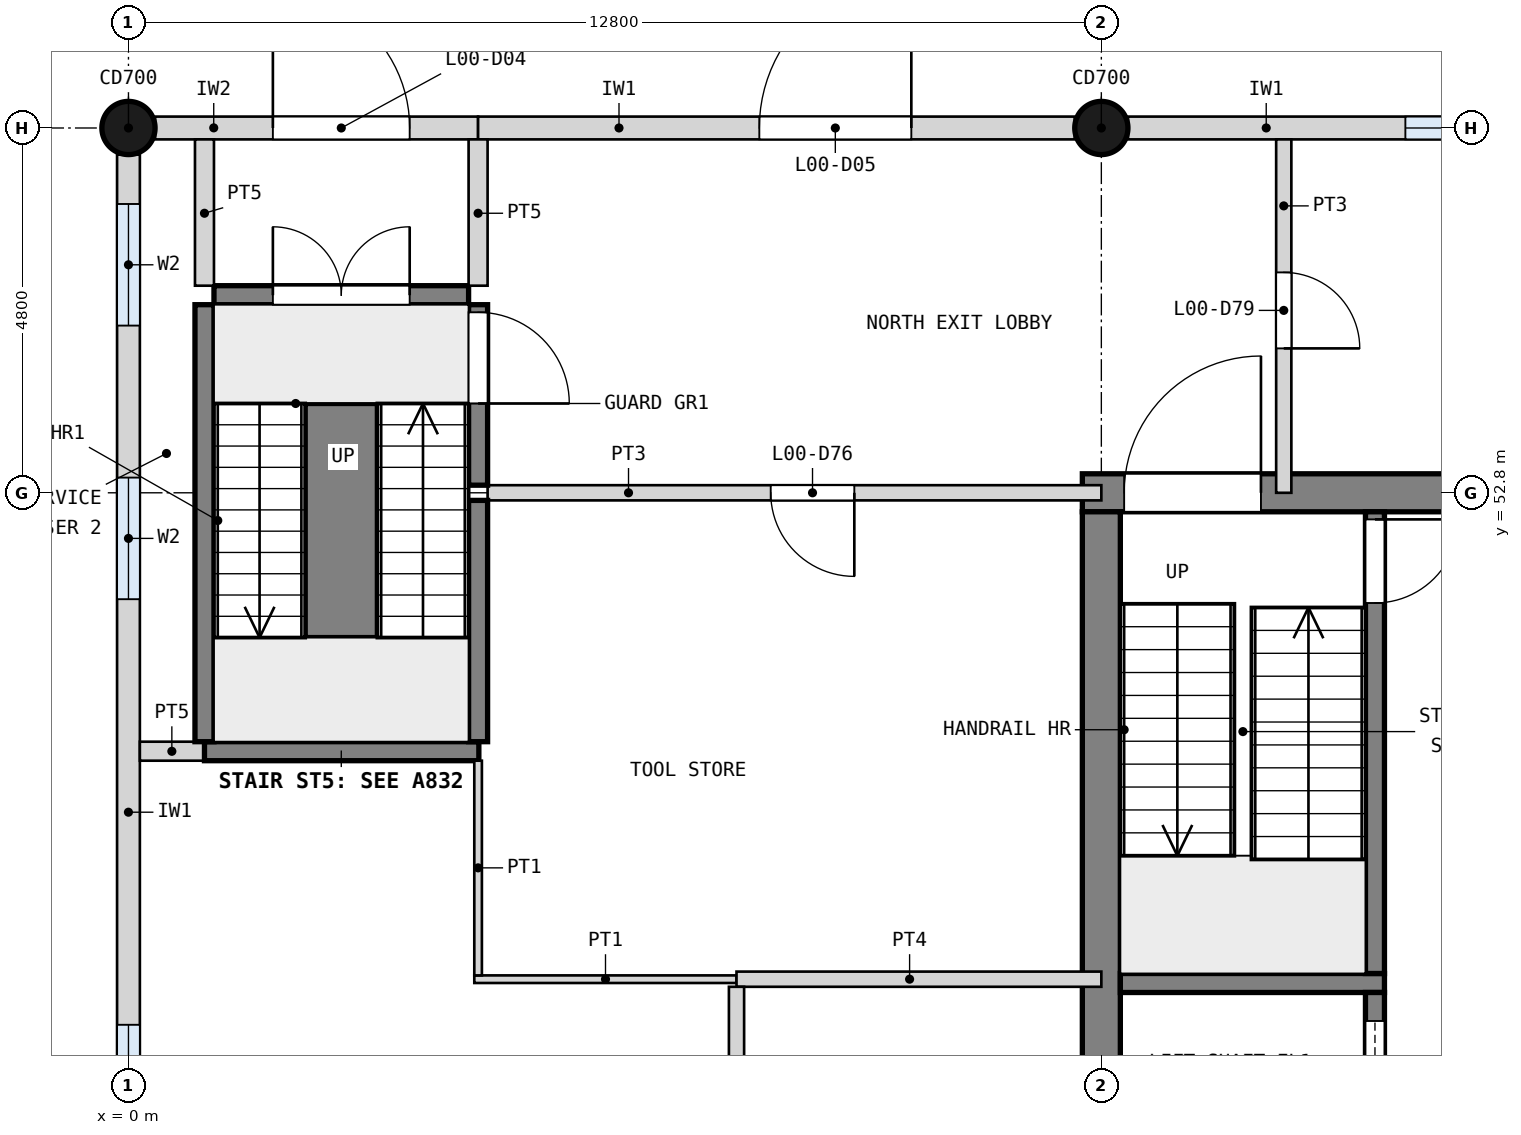
"""IFC4 building model, lengths in metres.
Left out: names, types, materials, properties, quantities, classifications, styles, units other than length and angle.
Written with IfcOpenShell. Run it as: python <this file> out.ifc"""

import sys

from ifc_helpers import new_model, si_unit, direction, frame, frame_2d, origin, origin_2d, place, context, subcontext, project, spatial, rectangle, circle, extrude, element, fill, save


model = new_model("IFC4")
c1 = context("Model", 3, precision=1e-05, world=origin(), true_north=direction((0.0, 1.0)))
c2 = subcontext(c1, "Body", "Model", "MODEL_VIEW")
j1 = project(units=[si_unit("LENGTHUNIT", "METRE"), si_unit("PLANEANGLEUNIT", "RADIAN")], contexts=[c1])
p1 = place(None, origin())
s1 = spatial("IfcSite", under=j1, at=p1, CompositionType="ELEMENT")
p2 = place(p1, origin())
s2 = spatial("IfcBuilding", under=s1, at=p2, CompositionType="ELEMENT")
p3 = place(p2, origin())
s3 = spatial("IfcBuildingStorey", under=s2, at=p3, CompositionType="ELEMENT", Elevation=0.0)
p4 = place(p3, frame((12.55, 52.8, 0.0), z_axis=(0.0, 0.0, 1.0), x_axis=(1.0, 0.0, 0.0)))
e1 = element("IfcWall", 1, at=p4, inside=s3, PredefinedType="SHEAR", context=c2, shape_type="SweptSolid", body=[
    extrude(rectangle(XDim=13.3, YDim=0.5, at=frame_2d((6.65, 0.0))), origin(), (0.0, 0.0, 1.0), 4.2),
])
p5 = place(p4, frame((0.55, 0.0, 0.0)))
e2 = element("IfcOpeningElement", 2, at=p5, cuts=e1, PredefinedType="OPENING", context=c2, shape_type="SweptSolid", body=[
    extrude(rectangle(XDim=1.8, YDim=2.1, at=frame_2d((0.9, 1.05))), frame((0.0, 0.26, 0.0), z_axis=(0.0, -1.0, 0.0), x_axis=(1.0, 0.0, 0.0)), (0.0, 0.0, 1.0), 0.52),
])
p6 = place(p3, frame((12.8, 33.85, 0.0), z_axis=(0.0, 0.0, 1.0), x_axis=(0.0, 1.0, 0.0)))
e3 = element("IfcWall", 3, at=p6, inside=s3, PredefinedType="SHEAR", context=c2, shape_type="SweptSolid", body=[
    extrude(rectangle(XDim=18.7, YDim=0.5, at=frame_2d((9.35, 0.0))), origin(), (0.0, 0.0, 1.0), 4.2),
])
for number, where, z_axis, x_axis in (
    (4, (0.0, 57.6, 0.0), (0.0, 0.0, 1.0), (1.0, 0.0, 0.0)),
    (5, (12.8, 57.6, 0.0), (0.0, 0.0, 1.0), (1.0, 0.0, 0.0)),
):
    element("IfcColumn", number, at=place(p3, frame(where, z_axis=z_axis, x_axis=x_axis)), inside=s3, PredefinedType="COLUMN", context=c2, shape_type="SweptSolid", body=[
        extrude(circle(Radius=0.35, at=origin_2d()), origin(), (0.0, 0.0, 1.0), 4.2),
    ])
p7 = place(p3, frame((0.35, 57.6, 0.0), z_axis=(0.0, 0.0, 1.0), x_axis=(1.0, 0.0, 0.0)))
e6 = element("IfcWall", 6, at=p7, inside=s3, PredefinedType="SOLIDWALL", context=c2, shape_type="SweptSolid", body=[
    extrude(rectangle(XDim=4.25, YDim=0.3, at=frame_2d((2.125, 0.0))), origin(), (0.0, 0.0, 1.0), 3.0),
])
p8 = place(p7, frame((1.55, 0.0, 0.0)))
e7 = element("IfcOpeningElement", 7, at=p8, cuts=e6, PredefinedType="OPENING", context=c2, shape_type="SweptSolid", body=[
    extrude(rectangle(XDim=1.8, YDim=2.1, at=frame_2d((0.9, 1.05))), frame((0.0, 0.16, 0.0), z_axis=(0.0, -1.0, 0.0), x_axis=(1.0, 0.0, 0.0)), (0.0, 0.0, 1.0), 0.32),
])
p9 = place(p3, frame((4.6, 57.6, 0.0), z_axis=(0.0, 0.0, 1.0), x_axis=(1.0, 0.0, 0.0)))
e8 = element("IfcWall", 8, at=p9, inside=s3, PredefinedType="SOLIDWALL", context=c2, shape_type="SweptSolid", body=[
    extrude(rectangle(XDim=7.85, YDim=0.3, at=frame_2d((3.925, 0.0))), origin(), (0.0, 0.0, 1.0), 3.0),
])
p10 = place(p9, frame((3.7, 0.0, 0.0)))
e9 = element("IfcOpeningElement", 9, at=p10, cuts=e8, PredefinedType="OPENING", context=c2, shape_type="SweptSolid", body=[
    extrude(rectangle(XDim=2.0, YDim=2.1, at=frame_2d((1.0, 1.05))), frame((0.0, 0.16, 0.0), z_axis=(0.0, -1.0, 0.0), x_axis=(1.0, 0.0, 0.0)), (0.0, 0.0, 1.0), 0.32),
])
p11 = place(p3, frame((13.15, 57.6, 0.0), z_axis=(0.0, 0.0, 1.0), x_axis=(1.0, 0.0, 0.0)))
e10 = element("IfcWall", 10, at=p11, inside=s3, PredefinedType="SOLIDWALL", context=c2, shape_type="SweptSolid", body=[
    extrude(rectangle(XDim=12.45, YDim=0.3, at=frame_2d((6.225, 0.0))), origin(), (0.0, 0.0, 1.0), 3.0),
])
p12 = place(p11, frame((6.35, 0.0, 0.3)))
e11 = element("IfcOpeningElement", 11, at=p12, cuts=e10, PredefinedType="OPENING", context=c2, shape_type="SweptSolid", body=[
    extrude(rectangle(XDim=1.6, YDim=2.4, at=frame_2d((0.8, 1.2))), frame((0.0, 0.16, 0.0), z_axis=(0.0, -1.0, 0.0), x_axis=(1.0, 0.0, 0.0)), (0.0, 0.0, 1.0), 0.32),
])
p13 = place(p11, frame((3.65, 0.0, 0.3)))
e12 = element("IfcOpeningElement", 12, at=p13, cuts=e10, PredefinedType="OPENING", context=c2, shape_type="SweptSolid", body=[
    extrude(rectangle(XDim=1.6, YDim=2.4, at=frame_2d((0.8, 1.2))), frame((0.0, 0.16, 0.0), z_axis=(0.0, -1.0, 0.0), x_axis=(1.0, 0.0, 0.0)), (0.0, 0.0, 1.0), 0.32),
])
p14 = place(p11, frame((10.05, 0.0, 0.3)))
e13 = element("IfcOpeningElement", 13, at=p14, cuts=e10, PredefinedType="OPENING", context=c2, shape_type="SweptSolid", body=[
    extrude(rectangle(XDim=1.6, YDim=2.4, at=frame_2d((0.8, 1.2))), frame((0.0, 0.16, 0.0), z_axis=(0.0, -1.0, 0.0), x_axis=(1.0, 0.0, 0.0)), (0.0, 0.0, 1.0), 0.32),
])
p15 = place(p3, frame((0.0, 43.55, 0.0), z_axis=(0.0, 0.0, 1.0), x_axis=(0.0, 1.0, 0.0)))
e14 = element("IfcWall", 14, at=p15, inside=s3, PredefinedType="SOLIDWALL", context=c2, shape_type="SweptSolid", body=[
    extrude(rectangle(XDim=13.7, YDim=0.3, at=frame_2d((6.85, 0.0))), origin(), (0.0, 0.0, 1.0), 3.0),
])
p16 = place(p15, frame((0.65, 0.0, 0.3)))
e15 = element("IfcOpeningElement", 15, at=p16, cuts=e14, PredefinedType="OPENING", context=c2, shape_type="SweptSolid", body=[
    extrude(rectangle(XDim=1.6, YDim=2.4, at=frame_2d((0.8, 1.2))), frame((0.0, 0.16, 0.0), z_axis=(0.0, -1.0, 0.0), x_axis=(1.0, 0.0, 0.0)), (0.0, 0.0, 1.0), 0.32),
])
p17 = place(p15, frame((7.85, 0.0, 0.3)))
e16 = element("IfcOpeningElement", 16, at=p17, cuts=e14, PredefinedType="OPENING", context=c2, shape_type="SweptSolid", body=[
    extrude(rectangle(XDim=1.6, YDim=2.4, at=frame_2d((0.8, 1.2))), frame((0.0, 0.16, 0.0), z_axis=(0.0, -1.0, 0.0), x_axis=(1.0, 0.0, 0.0)), (0.0, 0.0, 1.0), 0.32),
])
p18 = place(p15, frame((11.45, 0.0, 0.3)))
e17 = element("IfcOpeningElement", 17, at=p18, cuts=e14, PredefinedType="OPENING", context=c2, shape_type="SweptSolid", body=[
    extrude(rectangle(XDim=1.6, YDim=2.4, at=frame_2d((0.8, 1.2))), frame((0.0, 0.16, 0.0), z_axis=(0.0, -1.0, 0.0), x_axis=(1.0, 0.0, 0.0)), (0.0, 0.0, 1.0), 0.32),
])
p19 = place(p3, frame((13.05, 46.35, 0.0), z_axis=(0.0, 0.0, 1.0), x_axis=(1.0, 0.0, 0.0)))
e18 = element("IfcWall", 18, at=p19, inside=s3, PredefinedType="SOLIDWALL", context=c2, shape_type="SweptSolid", body=[
    extrude(rectangle(XDim=3.475, YDim=0.25, at=frame_2d((1.737, 0.0))), origin(), (0.0, 0.0, 1.0), 3.9),
])
p20 = place(p3, frame((16.4, 44.375, 0.0), z_axis=(0.0, 0.0, 1.0), x_axis=(0.0, 1.0, 0.0)))
e19 = element("IfcWall", 19, at=p20, inside=s3, PredefinedType="SOLIDWALL", context=c2, shape_type="SweptSolid", body=[
    extrude(rectangle(XDim=1.85, YDim=0.25, at=frame_2d((0.925, 0.0))), origin(), (0.0, 0.0, 1.0), 3.9),
])
p21 = place(p20, frame((0.375, 0.0, 0.0)))
e20 = element("IfcOpeningElement", 20, at=p21, cuts=e19, PredefinedType="OPENING", context=c2, shape_type="SweptSolid", body=[
    extrude(rectangle(XDim=1.1, YDim=2.1, at=frame_2d((0.55, 1.05))), frame((0.0, 0.135, 0.0), z_axis=(0.0, -1.0, 0.0), x_axis=(1.0, 0.0, 0.0)), (0.0, 0.0, 1.0), 0.27),
])
p22 = place(p3, frame((16.4, 46.475, 0.0), z_axis=(0.0, 0.0, 1.0), x_axis=(0.0, 1.0, 0.0)))
e21 = element("IfcWall", 21, at=p22, inside=s3, PredefinedType="SOLIDWALL", context=c2, shape_type="SweptSolid", body=[
    extrude(rectangle(XDim=6.075, YDim=0.25, at=frame_2d((3.038, 0.0))), origin(), (0.0, 0.0, 1.0), 3.9),
])
p23 = place(p22, frame((4.875, 0.0, 0.0)))
e22 = element("IfcOpeningElement", 22, at=p23, cuts=e21, PredefinedType="OPENING", context=c2, shape_type="SweptSolid", body=[
    extrude(rectangle(XDim=1.1, YDim=2.1, at=frame_2d((0.55, 1.05))), frame((0.0, 0.135, 0.0), z_axis=(0.0, -1.0, 0.0), x_axis=(1.0, 0.0, 0.0)), (0.0, 0.0, 1.0), 0.27),
])
p24 = place(p3, frame((4.55, 46.4, 0.0), z_axis=(0.0, 0.0, 1.0), x_axis=(1.0, 0.0, 0.0)))
e23 = element("IfcWall", 23, at=p24, inside=s3, PredefinedType="PARTITIONING", context=c2, shape_type="SweptSolid", body=[
    extrude(rectangle(XDim=3.45, YDim=0.1, at=frame_2d((1.725, 0.0))), origin(), (0.0, 0.0, 1.0), 3.9),
])
p25 = place(p3, frame((8.0, 46.4, 0.0), z_axis=(0.0, 0.0, 1.0), x_axis=(1.0, 0.0, 0.0)))
e24 = element("IfcWall", 24, at=p25, inside=s3, PredefinedType="PARTITIONING", context=c2, shape_type="SweptSolid", body=[
    extrude(rectangle(XDim=4.8, YDim=0.2, at=frame_2d((2.4, 0.0))), origin(), (0.0, 0.0, 1.0), 3.9),
])
p26 = place(p3, frame((0.15, 49.4, 0.0), z_axis=(0.0, 0.0, 1.0), x_axis=(1.0, 0.0, 0.0)))
e25 = element("IfcWall", 25, at=p26, inside=s3, PredefinedType="PARTITIONING", context=c2, shape_type="SweptSolid", body=[
    extrude(rectangle(XDim=0.85, YDim=0.25, at=frame_2d((0.425, 0.0))), origin(), (0.0, 0.0, 1.0), 3.9),
])
p27 = place(p3, frame((1.0, 49.4, 0.0), z_axis=(0.0, 0.0, 1.0), x_axis=(1.0, 0.0, 0.0)))
e26 = element("IfcWall", 26, at=p27, inside=s3, PredefinedType="SHEAR", context=c2, shape_type="SweptSolid", body=[
    extrude(rectangle(XDim=3.61, YDim=0.25, at=frame_2d((1.805, 0.0))), origin(), (0.0, 0.0, 1.0), 3.9),
])
p28 = place(p3, frame((4.725, 52.8, 0.0), z_axis=(0.0, 0.0, 1.0), x_axis=(1.0, 0.0, 0.0)))
e27 = element("IfcWall", 27, at=p28, inside=s3, PredefinedType="PARTITIONING", context=c2, shape_type="SweptSolid", body=[
    extrude(rectangle(XDim=8.075, YDim=0.2, at=frame_2d((4.038, 0.0))), origin(), (0.0, 0.0, 1.0), 3.9),
])
p29 = place(p28, frame((3.725, 0.0, 0.0)))
e28 = element("IfcOpeningElement", 28, at=p29, cuts=e27, PredefinedType="OPENING", context=c2, shape_type="SweptSolid", body=[
    extrude(rectangle(XDim=1.1, YDim=2.1, at=frame_2d((0.55, 1.05))), frame((0.0, 0.11, 0.0), z_axis=(0.0, -1.0, 0.0), x_axis=(1.0, 0.0, 0.0)), (0.0, 0.0, 1.0), 0.22),
])
p30 = place(p3, frame((1.125, 55.4, 0.0), z_axis=(0.0, 0.0, 1.0), x_axis=(1.0, 0.0, 0.0)))
e29 = element("IfcWall", 29, at=p30, inside=s3, PredefinedType="SHEAR", context=c2, shape_type="SweptSolid", body=[
    extrude(rectangle(XDim=3.35, YDim=0.25, at=frame_2d((1.675, 0.0))), origin(), (0.0, 0.0, 1.0), 3.9),
])
p31 = place(p30, frame((0.775, 0.0, 0.0)))
e30 = element("IfcOpeningElement", 30, at=p31, cuts=e29, PredefinedType="OPENING", context=c2, shape_type="SweptSolid", body=[
    extrude(rectangle(XDim=1.8, YDim=2.1, at=frame_2d((0.9, 1.05))), frame((0.0, 0.135, 0.0), z_axis=(0.0, -1.0, 0.0), x_axis=(1.0, 0.0, 0.0)), (0.0, 0.0, 1.0), 0.27),
])
p32 = place(p3, frame((1.0, 49.525, 0.0), z_axis=(0.0, 0.0, 1.0), x_axis=(0.0, 1.0, 0.0)))
e31 = element("IfcWall", 31, at=p32, inside=s3, PredefinedType="SHEAR", context=c2, shape_type="SweptSolid", body=[
    extrude(rectangle(XDim=5.75, YDim=0.25, at=frame_2d((2.875, 0.0))), origin(), (0.0, 0.0, 1.0), 3.9),
])
p33 = place(p3, frame((1.0, 55.525, 0.0), z_axis=(0.0, 0.0, 1.0), x_axis=(0.0, 1.0, 0.0)))
e32 = element("IfcWall", 32, at=p33, inside=s3, PredefinedType="PARTITIONING", context=c2, shape_type="SweptSolid", body=[
    extrude(rectangle(XDim=1.925, YDim=0.25, at=frame_2d((0.962, 0.0))), origin(), (0.0, 0.0, 1.0), 3.9),
])
p34 = place(p3, frame((4.6, 46.45, 0.0), z_axis=(0.0, 0.0, 1.0), x_axis=(0.0, 1.0, 0.0)))
e33 = element("IfcWall", 33, at=p34, inside=s3, PredefinedType="PARTITIONING", context=c2, shape_type="SweptSolid", body=[
    extrude(rectangle(XDim=2.825, YDim=0.1, at=frame_2d((1.413, 0.0))), origin(), (0.0, 0.0, 1.0), 3.9),
])
p35 = place(p3, frame((4.6, 49.525, 0.0), z_axis=(0.0, 0.0, 1.0), x_axis=(0.0, 1.0, 0.0)))
e34 = element("IfcWall", 34, at=p35, inside=s3, PredefinedType="SHEAR", context=c2, shape_type="SweptSolid", body=[
    extrude(rectangle(XDim=3.175, YDim=0.25, at=frame_2d((1.587, 0.0))), origin(), (0.0, 0.0, 1.0), 3.9),
])
p36 = place(p3, frame((4.6, 52.9, 0.0), z_axis=(0.0, 0.0, 1.0), x_axis=(0.0, 1.0, 0.0)))
e35 = element("IfcWall", 35, at=p36, inside=s3, PredefinedType="SHEAR", context=c2, shape_type="SweptSolid", body=[
    extrude(rectangle(XDim=2.375, YDim=0.25, at=frame_2d((1.188, 0.0))), origin(), (0.0, 0.0, 1.0), 3.9),
])
p37 = place(p36, frame((1.075, 0.0, 0.0)))
e36 = element("IfcOpeningElement", 36, at=p37, cuts=e35, PredefinedType="OPENING", context=c2, shape_type="SweptSolid", body=[
    extrude(rectangle(XDim=1.2, YDim=2.1, at=frame_2d((0.6, 1.05))), frame((0.0, 0.135, 0.0), z_axis=(0.0, -1.0, 0.0), x_axis=(1.0, 0.0, 0.0)), (0.0, 0.0, 1.0), 0.27),
])
p38 = place(p3, frame((4.6, 55.525, 0.0), z_axis=(0.0, 0.0, 1.0), x_axis=(0.0, 1.0, 0.0)))
e37 = element("IfcWall", 37, at=p38, inside=s3, PredefinedType="PARTITIONING", context=c2, shape_type="SweptSolid", body=[
    extrude(rectangle(XDim=1.925, YDim=0.25, at=frame_2d((0.962, 0.0))), origin(), (0.0, 0.0, 1.0), 3.9),
])
p39 = place(p3, frame((8.0, 33.7, 0.0), z_axis=(0.0, 0.0, 1.0), x_axis=(0.0, 1.0, 0.0)))
e38 = element("IfcWall", 38, at=p39, inside=s3, PredefinedType="PARTITIONING", context=c2, shape_type="SweptSolid", body=[
    extrude(rectangle(XDim=12.6, YDim=0.2, at=frame_2d((6.3, 0.0))), origin(), (0.0, 0.0, 1.0), 3.9),
])
p40 = place(p3, frame((15.2, 52.8, 0.0), z_axis=(0.0, 0.0, 1.0), x_axis=(0.0, 1.0, 0.0)))
e39 = element("IfcWall", 39, at=p40, inside=s3, PredefinedType="PARTITIONING", context=c2, shape_type="SweptSolid", body=[
    extrude(rectangle(XDim=4.65, YDim=0.2, at=frame_2d((2.325, 0.0))), origin(), (0.0, 0.0, 1.0), 3.9),
])
p41 = place(p40, frame((1.9, 0.0, 0.0)))
e40 = element("IfcOpeningElement", 40, at=p41, cuts=e39, PredefinedType="OPENING", context=c2, shape_type="SweptSolid", body=[
    extrude(rectangle(XDim=1.0, YDim=2.1, at=frame_2d((0.5, 1.05))), frame((0.0, 0.11, 0.0), z_axis=(0.0, -1.0, 0.0), x_axis=(1.0, 0.0, 0.0)), (0.0, 0.0, 1.0), 0.22),
])
p42 = place(p3, frame((2.8, 53.975, 0.0), z_axis=(0.0, 0.0, 1.0), x_axis=(0.0, -1.0, 0.0)))
e41 = element("IfcWall", 41, at=p42, inside=s3, PredefinedType="SHEAR", context=c2, shape_type="SweptSolid", body=[
    extrude(rectangle(XDim=3.08, YDim=0.95, at=frame_2d((1.54, 0.0))), origin(), (0.0, 0.0, 1.0), 4.2),
])
p43 = place(p8, origin())
e42 = element("IfcDoor", 42, at=p43, inside=s3, OperationType="SINGLE_SWING_LEFT", PredefinedType="DOOR", context=c2, shape_type="SweptSolid", body=[
    extrude(rectangle(XDim=1.8, YDim=2.1, at=frame_2d((0.9, 1.05))), frame((0.0, 0.025, 0.0), z_axis=(0.0, -1.0, 0.0), x_axis=(1.0, 0.0, 0.0)), (0.0, 0.0, 1.0), 0.05),
])
fill(e7, e42)
p44 = place(p10, origin())
e43 = element("IfcDoor", 43, at=p44, inside=s3, OperationType="SINGLE_SWING_RIGHT", PredefinedType="DOOR", context=c2, shape_type="SweptSolid", body=[
    extrude(rectangle(XDim=2.0, YDim=2.1, at=frame_2d((1.0, 1.05))), frame((0.0, 0.025, 0.0), z_axis=(0.0, -1.0, 0.0), x_axis=(1.0, 0.0, 0.0)), (0.0, 0.0, 1.0), 0.05),
])
fill(e9, e43)
p45 = place(p23, frame((1.1, 0.0, 0.0), z_axis=(0.0, 0.0, 1.0), x_axis=(-1.0, 0.0, 0.0)))
e44 = element("IfcDoor", 44, at=p45, inside=s3, OperationType="SINGLE_SWING_LEFT", PredefinedType="DOOR", context=c2, shape_type="SweptSolid", body=[
    extrude(rectangle(XDim=1.1, YDim=2.1, at=frame_2d((0.55, 1.05))), frame((0.0, 0.025, 0.0), z_axis=(0.0, -1.0, 0.0), x_axis=(1.0, 0.0, 0.0)), (0.0, 0.0, 1.0), 0.05),
])
fill(e22, e44)
p46 = place(p21, origin())
e45 = element("IfcDoor", 45, at=p46, inside=s3, OperationType="SLIDING_TO_LEFT", PredefinedType="DOOR", context=c2, shape_type="SweptSolid", body=[
    extrude(rectangle(XDim=1.1, YDim=2.1, at=frame_2d((0.55, 1.05))), frame((0.0, 0.025, 0.0), z_axis=(0.0, -1.0, 0.0), x_axis=(1.0, 0.0, 0.0)), (0.0, 0.0, 1.0), 0.05),
])
fill(e20, e45)
p47 = place(p5, origin())
e46 = element("IfcDoor", 46, at=p47, inside=s3, OperationType="SINGLE_SWING_RIGHT", PredefinedType="DOOR", context=c2, shape_type="SweptSolid", body=[
    extrude(rectangle(XDim=1.8, YDim=2.1, at=frame_2d((0.9, 1.05))), frame((0.0, 0.025, 0.0), z_axis=(0.0, -1.0, 0.0), x_axis=(1.0, 0.0, 0.0)), (0.0, 0.0, 1.0), 0.05),
])
fill(e2, e46)
p48 = place(p29, frame((1.1, 0.0, 0.0), z_axis=(0.0, 0.0, 1.0), x_axis=(-1.0, 0.0, 0.0)))
e47 = element("IfcDoor", 47, at=p48, inside=s3, OperationType="SINGLE_SWING_LEFT", PredefinedType="DOOR", context=c2, shape_type="SweptSolid", body=[
    extrude(rectangle(XDim=1.1, YDim=2.1, at=frame_2d((0.55, 1.05))), frame((0.0, 0.025, 0.0), z_axis=(0.0, -1.0, 0.0), x_axis=(1.0, 0.0, 0.0)), (0.0, 0.0, 1.0), 0.05),
])
fill(e28, e47)
p49 = place(p37, frame((1.2, 0.0, 0.0), z_axis=(0.0, 0.0, 1.0), x_axis=(-1.0, 0.0, 0.0)))
e48 = element("IfcDoor", 48, at=p49, inside=s3, OperationType="SINGLE_SWING_RIGHT", PredefinedType="DOOR", context=c2, shape_type="SweptSolid", body=[
    extrude(rectangle(XDim=1.2, YDim=2.1, at=frame_2d((0.6, 1.05))), frame((0.0, 0.025, 0.0), z_axis=(0.0, -1.0, 0.0), x_axis=(1.0, 0.0, 0.0)), (0.0, 0.0, 1.0), 0.05),
])
fill(e36, e48)
p50 = place(p31, origin())
e49 = element("IfcDoor", 49, at=p50, inside=s3, OperationType="DOUBLE_DOOR_SINGLE_SWING", PredefinedType="DOOR", context=c2, shape_type="SweptSolid", body=[
    extrude(rectangle(XDim=1.8, YDim=2.1, at=frame_2d((0.9, 1.05))), frame((0.0, 0.025, 0.0), z_axis=(0.0, -1.0, 0.0), x_axis=(1.0, 0.0, 0.0)), (0.0, 0.0, 1.0), 0.05),
])
fill(e30, e49)
p51 = place(p41, frame((1.0, 0.0, 0.0), z_axis=(0.0, 0.0, 1.0), x_axis=(-1.0, 0.0, 0.0)))
e50 = element("IfcDoor", 50, at=p51, inside=s3, OperationType="SINGLE_SWING_RIGHT", PredefinedType="DOOR", context=c2, shape_type="SweptSolid", body=[
    extrude(rectangle(XDim=1.0, YDim=2.1, at=frame_2d((0.5, 1.05))), frame((0.0, 0.025, 0.0), z_axis=(0.0, -1.0, 0.0), x_axis=(1.0, 0.0, 0.0)), (0.0, 0.0, 1.0), 0.05),
])
fill(e40, e50)
p52 = place(p13, origin())
e51 = element("IfcWindow", 51, at=p52, inside=s3, PartitioningType="SINGLE_PANEL", PredefinedType="WINDOW", context=c2, shape_type="SweptSolid", body=[
    extrude(rectangle(XDim=1.6, YDim=2.4, at=frame_2d((0.8, 1.2))), frame((0.0, 0.03, 0.0), z_axis=(0.0, -1.0, 0.0), x_axis=(1.0, 0.0, 0.0)), (0.0, 0.0, 1.0), 0.06),
])
fill(e12, e51)
p53 = place(p16, origin())
e52 = element("IfcWindow", 52, at=p53, inside=s3, PartitioningType="SINGLE_PANEL", PredefinedType="WINDOW", context=c2, shape_type="SweptSolid", body=[
    extrude(rectangle(XDim=1.6, YDim=2.4, at=frame_2d((0.8, 1.2))), frame((0.0, 0.03, 0.0), z_axis=(0.0, -1.0, 0.0), x_axis=(1.0, 0.0, 0.0)), (0.0, 0.0, 1.0), 0.06),
])
fill(e15, e52)
p54 = place(p17, origin())
e53 = element("IfcWindow", 53, at=p54, inside=s3, PartitioningType="SINGLE_PANEL", PredefinedType="WINDOW", context=c2, shape_type="SweptSolid", body=[
    extrude(rectangle(XDim=1.6, YDim=2.4, at=frame_2d((0.8, 1.2))), frame((0.0, 0.03, 0.0), z_axis=(0.0, -1.0, 0.0), x_axis=(1.0, 0.0, 0.0)), (0.0, 0.0, 1.0), 0.06),
])
fill(e16, e53)
p55 = place(p18, origin())
e54 = element("IfcWindow", 54, at=p55, inside=s3, PartitioningType="SINGLE_PANEL", PredefinedType="WINDOW", context=c2, shape_type="SweptSolid", body=[
    extrude(rectangle(XDim=1.6, YDim=2.4, at=frame_2d((0.8, 1.2))), frame((0.0, 0.03, 0.0), z_axis=(0.0, -1.0, 0.0), x_axis=(1.0, 0.0, 0.0)), (0.0, 0.0, 1.0), 0.06),
])
fill(e17, e54)
save(model, sys.argv[1])
